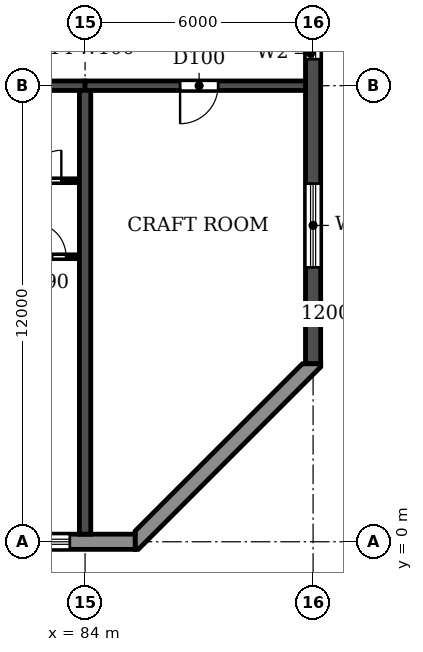
"""IFC4 building model, lengths in metres.
Left out: names, types, materials, properties, quantities, classifications, styles, units other than length and angle.
Written with IfcOpenShell. Run it as: python <this file> out.ifc"""

import sys

from ifc_helpers import new_model, si_unit, direction, frame, frame_2d, origin, place, context, subcontext, project, spatial, polyline, rectangle, outline, extrude, element, fill, save


model = new_model("IFC4")
c1 = context("Model", 3, precision=1e-05, world=origin(), true_north=direction((0.0, 1.0)))
c2 = subcontext(c1, "Body", "Model", "MODEL_VIEW")
j1 = project(units=[si_unit("LENGTHUNIT", "METRE"), si_unit("PLANEANGLEUNIT", "RADIAN")], contexts=[c1])
p1 = place(None, origin())
s1 = spatial("IfcSite", under=j1, at=p1, CompositionType="ELEMENT")
p2 = place(p1, origin())
s2 = spatial("IfcBuilding", under=s1, at=p2, CompositionType="ELEMENT")
p3 = place(p2, frame((0.0, 0.0, 122.4)))
s3 = spatial("IfcBuildingStorey", under=s2, at=p3, CompositionType="ELEMENT", Elevation=122.4)
p4 = place(p3, frame((84.0, 0.2, 0.0), z_axis=(0.0, 0.0, 1.0), x_axis=(0.0, 1.0, 0.0)))
e1 = element("IfcWall", 1, at=p4, inside=s3, PredefinedType="SHEAR", context=c2, shape_type="SweptSolid", body=[
    extrude(rectangle(XDim=11.675, YDim=0.3, at=frame_2d((5.837, 0.0))), origin(), (0.0, 0.0, 1.0), 3.07),
])
p5 = place(p3, frame((90.0, 4.683, 0.0), z_axis=(0.0, 0.0, 1.0), x_axis=(0.0, 1.0, 0.0)))
e2 = element("IfcWall", 2, at=p5, inside=s3, PredefinedType="SHEAR", context=c2, shape_type="SweptSolid", body=[
    extrude(rectangle(XDim=33.034, YDim=0.4, at=frame_2d((16.517, 0.0))), origin(), (0.0, 0.0, 1.0), 3.07),
])
p6 = place(p5, frame((23.817, 0.0, 0.9)))
e3 = element("IfcOpeningElement", 3, at=p6, cuts=e2, PredefinedType="OPENING", context=c2, shape_type="SweptSolid", body=[
    extrude(rectangle(XDim=1.2, YDim=1.5, at=frame_2d((0.6, 0.75))), frame((0.0, 0.21, 0.0), z_axis=(0.0, -1.0, 0.0), x_axis=(1.0, 0.0, 0.0)), (0.0, 0.0, 1.0), 0.42),
])
p7 = place(p5, frame((8.017, 0.0, 0.9)))
e4 = element("IfcOpeningElement", 4, at=p7, cuts=e2, PredefinedType="OPENING", context=c2, shape_type="SweptSolid", body=[
    extrude(rectangle(XDim=1.2, YDim=1.5, at=frame_2d((0.6, 0.75))), frame((0.0, 0.21, 0.0), z_axis=(0.0, -1.0, 0.0), x_axis=(1.0, 0.0, 0.0)), (0.0, 0.0, 1.0), 0.42),
])
p8 = place(p5, frame((28.293, 0.0, 0.6)))
e5 = element("IfcOpeningElement", 5, at=p8, cuts=e2, PredefinedType="OPENING", context=c2, shape_type="SweptSolid", body=[
    extrude(rectangle(XDim=2.2, YDim=1.8, at=frame_2d((1.1, 0.9))), frame((0.0, 0.21, 0.0), z_axis=(0.0, -1.0, 0.0), x_axis=(1.0, 0.0, 0.0)), (0.0, 0.0, 1.0), 0.42),
])
p9 = place(p5, frame((2.541, 0.0, 0.6)))
e6 = element("IfcOpeningElement", 6, at=p9, cuts=e2, PredefinedType="OPENING", context=c2, shape_type="SweptSolid", body=[
    extrude(rectangle(XDim=2.2, YDim=1.8, at=frame_2d((1.1, 0.9))), frame((0.0, 0.21, 0.0), z_axis=(0.0, -1.0, 0.0), x_axis=(1.0, 0.0, 0.0)), (0.0, 0.0, 1.0), 0.42),
])
p10 = place(p3, frame((78.0, 12.0, 0.0), z_axis=(0.0, 0.0, 1.0), x_axis=(1.0, 0.0, 0.0)))
e7 = element("IfcWall", 7, at=p10, inside=s3, PredefinedType="SHEAR", context=c2, shape_type="SweptSolid", body=[
    extrude(rectangle(XDim=6.0, YDim=0.25, at=frame_2d((3.0, 0.0))), origin(), (0.0, 0.0, 1.0), 2.47),
])
p11 = place(p10, frame((2.55, 0.0, 0.0)))
e8 = element("IfcOpeningElement", 8, at=p11, cuts=e7, PredefinedType="OPENING", context=c2, shape_type="SweptSolid", body=[
    extrude(rectangle(XDim=1.0, YDim=2.1, at=frame_2d((0.5, 1.05))), frame((0.0, 0.135, 0.0), z_axis=(0.0, -1.0, 0.0), x_axis=(1.0, 0.0, 0.0)), (0.0, 0.0, 1.0), 0.27),
])
p12 = place(p3, frame((84.0, 12.0, 0.0), z_axis=(0.0, 0.0, 1.0), x_axis=(1.0, 0.0, 0.0)))
e9 = element("IfcWall", 9, at=p12, inside=s3, PredefinedType="SHEAR", context=c2, shape_type="SweptSolid", body=[
    extrude(rectangle(XDim=5.8, YDim=0.25, at=frame_2d((2.9, 0.0))), origin(), (0.0, 0.0, 1.0), 2.47),
])
p13 = place(p12, frame((2.5, 0.0, 0.0)))
e10 = element("IfcOpeningElement", 10, at=p13, cuts=e9, PredefinedType="OPENING", context=c2, shape_type="SweptSolid", body=[
    extrude(rectangle(XDim=1.0, YDim=2.1, at=frame_2d((0.5, 1.05))), frame((0.0, 0.135, 0.0), z_axis=(0.0, -1.0, 0.0), x_axis=(1.0, 0.0, 0.0)), (0.0, 0.0, 1.0), 0.27),
])
p14 = place(p3, frame((16.683, 0.0, 0.0), z_axis=(0.0, 0.0, 1.0), x_axis=(1.0, 0.0, 0.0)))
e11 = element("IfcWall", 11, at=p14, inside=s3, PredefinedType="STANDARD", context=c2, shape_type="SweptSolid", body=[
    extrude(rectangle(XDim=68.634, YDim=0.4, at=frame_2d((34.317, 0.0))), origin(), (0.0, 0.0, 1.0), 3.07),
])
p15 = place(p14, frame((1.717, 0.0, 0.9)))
e12 = element("IfcOpeningElement", 12, at=p15, cuts=e11, PredefinedType="OPENING", context=c2, shape_type="SweptSolid", body=[
    extrude(rectangle(XDim=2.2, YDim=1.5, at=frame_2d((1.1, 0.75))), frame((0.0, 0.21, 0.0), z_axis=(0.0, -1.0, 0.0), x_axis=(1.0, 0.0, 0.0)), (0.0, 0.0, 1.0), 0.42),
])
p16 = place(p14, frame((4.717, 0.0, 0.9)))
e13 = element("IfcOpeningElement", 13, at=p16, cuts=e11, PredefinedType="OPENING", context=c2, shape_type="SweptSolid", body=[
    extrude(rectangle(XDim=2.2, YDim=1.5, at=frame_2d((1.1, 0.75))), frame((0.0, 0.21, 0.0), z_axis=(0.0, -1.0, 0.0), x_axis=(1.0, 0.0, 0.0)), (0.0, 0.0, 1.0), 0.42),
])
p17 = place(p14, frame((7.717, 0.0, 0.9)))
e14 = element("IfcOpeningElement", 14, at=p17, cuts=e11, PredefinedType="OPENING", context=c2, shape_type="SweptSolid", body=[
    extrude(rectangle(XDim=2.2, YDim=1.5, at=frame_2d((1.1, 0.75))), frame((0.0, 0.21, 0.0), z_axis=(0.0, -1.0, 0.0), x_axis=(1.0, 0.0, 0.0)), (0.0, 0.0, 1.0), 0.42),
])
p18 = place(p14, frame((10.717, 0.0, 0.9)))
e15 = element("IfcOpeningElement", 15, at=p18, cuts=e11, PredefinedType="OPENING", context=c2, shape_type="SweptSolid", body=[
    extrude(rectangle(XDim=2.2, YDim=1.5, at=frame_2d((1.1, 0.75))), frame((0.0, 0.21, 0.0), z_axis=(0.0, -1.0, 0.0), x_axis=(1.0, 0.0, 0.0)), (0.0, 0.0, 1.0), 0.42),
])
p19 = place(p14, frame((13.717, 0.0, 0.9)))
e16 = element("IfcOpeningElement", 16, at=p19, cuts=e11, PredefinedType="OPENING", context=c2, shape_type="SweptSolid", body=[
    extrude(rectangle(XDim=2.2, YDim=1.5, at=frame_2d((1.1, 0.75))), frame((0.0, 0.21, 0.0), z_axis=(0.0, -1.0, 0.0), x_axis=(1.0, 0.0, 0.0)), (0.0, 0.0, 1.0), 0.42),
])
p20 = place(p14, frame((16.717, 0.0, 0.9)))
e17 = element("IfcOpeningElement", 17, at=p20, cuts=e11, PredefinedType="OPENING", context=c2, shape_type="SweptSolid", body=[
    extrude(rectangle(XDim=2.2, YDim=1.5, at=frame_2d((1.1, 0.75))), frame((0.0, 0.21, 0.0), z_axis=(0.0, -1.0, 0.0), x_axis=(1.0, 0.0, 0.0)), (0.0, 0.0, 1.0), 0.42),
])
p21 = place(p14, frame((19.717, 0.0, 0.9)))
e18 = element("IfcOpeningElement", 18, at=p21, cuts=e11, PredefinedType="OPENING", context=c2, shape_type="SweptSolid", body=[
    extrude(rectangle(XDim=2.2, YDim=1.5, at=frame_2d((1.1, 0.75))), frame((0.0, 0.21, 0.0), z_axis=(0.0, -1.0, 0.0), x_axis=(1.0, 0.0, 0.0)), (0.0, 0.0, 1.0), 0.42),
])
p22 = place(p14, frame((22.917, 0.0, 0.0)))
e19 = element("IfcOpeningElement", 19, at=p22, cuts=e11, PredefinedType="OPENING", context=c2, shape_type="SweptSolid", body=[
    extrude(rectangle(XDim=1.8, YDim=2.4, at=frame_2d((0.9, 1.2))), frame((0.0, 0.21, 0.0), z_axis=(0.0, -1.0, 0.0), x_axis=(1.0, 0.0, 0.0)), (0.0, 0.0, 1.0), 0.42),
])
p23 = place(p14, frame((25.717, 0.0, 0.9)))
e20 = element("IfcOpeningElement", 20, at=p23, cuts=e11, PredefinedType="OPENING", context=c2, shape_type="SweptSolid", body=[
    extrude(rectangle(XDim=2.2, YDim=1.5, at=frame_2d((1.1, 0.75))), frame((0.0, 0.21, 0.0), z_axis=(0.0, -1.0, 0.0), x_axis=(1.0, 0.0, 0.0)), (0.0, 0.0, 1.0), 0.42),
])
p24 = place(p14, frame((28.717, 0.0, 0.9)))
e21 = element("IfcOpeningElement", 21, at=p24, cuts=e11, PredefinedType="OPENING", context=c2, shape_type="SweptSolid", body=[
    extrude(rectangle(XDim=2.2, YDim=1.5, at=frame_2d((1.1, 0.75))), frame((0.0, 0.21, 0.0), z_axis=(0.0, -1.0, 0.0), x_axis=(1.0, 0.0, 0.0)), (0.0, 0.0, 1.0), 0.42),
])
p25 = place(p14, frame((31.717, 0.0, 0.9)))
e22 = element("IfcOpeningElement", 22, at=p25, cuts=e11, PredefinedType="OPENING", context=c2, shape_type="SweptSolid", body=[
    extrude(rectangle(XDim=2.2, YDim=1.5, at=frame_2d((1.1, 0.75))), frame((0.0, 0.21, 0.0), z_axis=(0.0, -1.0, 0.0), x_axis=(1.0, 0.0, 0.0)), (0.0, 0.0, 1.0), 0.42),
])
p26 = place(p14, frame((34.917, 0.0, 0.0)))
e23 = element("IfcOpeningElement", 23, at=p26, cuts=e11, PredefinedType="OPENING", context=c2, shape_type="SweptSolid", body=[
    extrude(rectangle(XDim=1.8, YDim=2.4, at=frame_2d((0.9, 1.2))), frame((0.0, 0.21, 0.0), z_axis=(0.0, -1.0, 0.0), x_axis=(1.0, 0.0, 0.0)), (0.0, 0.0, 1.0), 0.42),
])
p27 = place(p14, frame((37.717, 0.0, 0.9)))
e24 = element("IfcOpeningElement", 24, at=p27, cuts=e11, PredefinedType="OPENING", context=c2, shape_type="SweptSolid", body=[
    extrude(rectangle(XDim=2.2, YDim=1.5, at=frame_2d((1.1, 0.75))), frame((0.0, 0.21, 0.0), z_axis=(0.0, -1.0, 0.0), x_axis=(1.0, 0.0, 0.0)), (0.0, 0.0, 1.0), 0.42),
])
p28 = place(p14, frame((40.717, 0.0, 0.9)))
e25 = element("IfcOpeningElement", 25, at=p28, cuts=e11, PredefinedType="OPENING", context=c2, shape_type="SweptSolid", body=[
    extrude(rectangle(XDim=2.2, YDim=1.5, at=frame_2d((1.1, 0.75))), frame((0.0, 0.21, 0.0), z_axis=(0.0, -1.0, 0.0), x_axis=(1.0, 0.0, 0.0)), (0.0, 0.0, 1.0), 0.42),
])
p29 = place(p14, frame((43.717, 0.0, 0.9)))
e26 = element("IfcOpeningElement", 26, at=p29, cuts=e11, PredefinedType="OPENING", context=c2, shape_type="SweptSolid", body=[
    extrude(rectangle(XDim=2.2, YDim=1.5, at=frame_2d((1.1, 0.75))), frame((0.0, 0.21, 0.0), z_axis=(0.0, -1.0, 0.0), x_axis=(1.0, 0.0, 0.0)), (0.0, 0.0, 1.0), 0.42),
])
p30 = place(p14, frame((46.917, 0.0, 0.0)))
e27 = element("IfcOpeningElement", 27, at=p30, cuts=e11, PredefinedType="OPENING", context=c2, shape_type="SweptSolid", body=[
    extrude(rectangle(XDim=1.8, YDim=2.4, at=frame_2d((0.9, 1.2))), frame((0.0, 0.21, 0.0), z_axis=(0.0, -1.0, 0.0), x_axis=(1.0, 0.0, 0.0)), (0.0, 0.0, 1.0), 0.42),
])
p31 = place(p14, frame((49.717, 0.0, 0.9)))
e28 = element("IfcOpeningElement", 28, at=p31, cuts=e11, PredefinedType="OPENING", context=c2, shape_type="SweptSolid", body=[
    extrude(rectangle(XDim=2.2, YDim=1.5, at=frame_2d((1.1, 0.75))), frame((0.0, 0.21, 0.0), z_axis=(0.0, -1.0, 0.0), x_axis=(1.0, 0.0, 0.0)), (0.0, 0.0, 1.0), 0.42),
])
p32 = place(p14, frame((52.717, 0.0, 0.9)))
e29 = element("IfcOpeningElement", 29, at=p32, cuts=e11, PredefinedType="OPENING", context=c2, shape_type="SweptSolid", body=[
    extrude(rectangle(XDim=2.2, YDim=1.5, at=frame_2d((1.1, 0.75))), frame((0.0, 0.21, 0.0), z_axis=(0.0, -1.0, 0.0), x_axis=(1.0, 0.0, 0.0)), (0.0, 0.0, 1.0), 0.42),
])
p33 = place(p14, frame((55.717, 0.0, 0.9)))
e30 = element("IfcOpeningElement", 30, at=p33, cuts=e11, PredefinedType="OPENING", context=c2, shape_type="SweptSolid", body=[
    extrude(rectangle(XDim=2.2, YDim=1.5, at=frame_2d((1.1, 0.75))), frame((0.0, 0.21, 0.0), z_axis=(0.0, -1.0, 0.0), x_axis=(1.0, 0.0, 0.0)), (0.0, 0.0, 1.0), 0.42),
])
p34 = place(p14, frame((58.917, 0.0, 0.0)))
e31 = element("IfcOpeningElement", 31, at=p34, cuts=e11, PredefinedType="OPENING", context=c2, shape_type="SweptSolid", body=[
    extrude(rectangle(XDim=1.8, YDim=2.4, at=frame_2d((0.9, 1.2))), frame((0.0, 0.21, 0.0), z_axis=(0.0, -1.0, 0.0), x_axis=(1.0, 0.0, 0.0)), (0.0, 0.0, 1.0), 0.42),
])
p35 = place(p14, frame((61.717, 0.0, 0.9)))
e32 = element("IfcOpeningElement", 32, at=p35, cuts=e11, PredefinedType="OPENING", context=c2, shape_type="SweptSolid", body=[
    extrude(rectangle(XDim=2.2, YDim=1.5, at=frame_2d((1.1, 0.75))), frame((0.0, 0.21, 0.0), z_axis=(0.0, -1.0, 0.0), x_axis=(1.0, 0.0, 0.0)), (0.0, 0.0, 1.0), 0.42),
])
p36 = place(p14, frame((64.717, 0.0, 0.9)))
e33 = element("IfcOpeningElement", 33, at=p36, cuts=e11, PredefinedType="OPENING", context=c2, shape_type="SweptSolid", body=[
    extrude(rectangle(XDim=2.2, YDim=1.5, at=frame_2d((1.1, 0.75))), frame((0.0, 0.21, 0.0), z_axis=(0.0, -1.0, 0.0), x_axis=(1.0, 0.0, 0.0)), (0.0, 0.0, 1.0), 0.42),
])
p37 = place(p3, origin())
e34 = element("IfcWall", 34, at=p37, inside=s3, PredefinedType="STANDARD", context=c2, shape_type="SweptSolid", body=[
    extrude(outline(polyline([(85.317, -0.2), (85.4, -0.2), (90.2, 4.6), (90.2, 4.683), (89.717, 4.683), (85.317, 0.283), (85.317, -0.2)])), origin(), (0.0, 0.0, 1.0), 3.07),
])
p38 = place(p3, frame((80.95, 7.5, 0.0), z_axis=(0.0, 0.0, 1.0), x_axis=(1.0, 0.0, 0.0)))
e35 = element("IfcWall", 35, at=p38, inside=s3, PredefinedType="PARTITIONING", context=c2, shape_type="SweptSolid", body=[
    extrude(rectangle(XDim=2.89, YDim=0.1, at=frame_2d((1.445, 0.0))), origin(), (0.0, 0.0, 1.0), 3.07),
])
p39 = place(p38, frame((1.65, 0.0, 0.0)))
e36 = element("IfcOpeningElement", 36, at=p39, cuts=e35, PredefinedType="OPENING", context=c2, shape_type="SweptSolid", body=[
    extrude(rectangle(XDim=0.9, YDim=2.1, at=frame_2d((0.45, 1.05))), frame((0.0, 0.06, 0.0), z_axis=(0.0, -1.0, 0.0), x_axis=(1.0, 0.0, 0.0)), (0.0, 0.0, 1.0), 0.12),
])
p40 = place(p3, frame((81.9, 9.5, 0.0), z_axis=(0.0, 0.0, 1.0), x_axis=(1.0, 0.0, 0.0)))
e37 = element("IfcWall", 37, at=p40, inside=s3, PredefinedType="PARTITIONING", context=c2, shape_type="SweptSolid", body=[
    extrude(rectangle(XDim=1.94, YDim=0.1, at=frame_2d((0.97, 0.0))), origin(), (0.0, 0.0, 1.0), 3.07),
])
p41 = place(p40, frame((0.675, 0.0, 0.0)))
e38 = element("IfcOpeningElement", 38, at=p41, cuts=e37, PredefinedType="OPENING", context=c2, shape_type="SweptSolid", body=[
    extrude(rectangle(XDim=0.8, YDim=2.1, at=frame_2d((0.4, 1.05))), frame((0.0, 0.06, 0.0), z_axis=(0.0, -1.0, 0.0), x_axis=(1.0, 0.0, 0.0)), (0.0, 0.0, 1.0), 0.12),
])
p42 = place(p36, origin())
e39 = element("IfcWindow", 39, at=p42, inside=s3, PartitioningType="DOUBLE_PANEL_HORIZONTAL", PredefinedType="WINDOW", context=c2, shape_type="SweptSolid", body=[
    extrude(rectangle(XDim=2.2, YDim=1.5, at=frame_2d((1.1, 0.75))), frame((0.0, 0.03, 0.0), z_axis=(0.0, -1.0, 0.0), x_axis=(1.0, 0.0, 0.0)), (0.0, 0.0, 1.0), 0.06),
])
fill(e33, e39)
p43 = place(p7, origin())
e40 = element("IfcWindow", 40, at=p43, inside=s3, PartitioningType="SINGLE_PANEL", PredefinedType="WINDOW", context=c2, shape_type="SweptSolid", body=[
    extrude(rectangle(XDim=1.2, YDim=1.5, at=frame_2d((0.6, 0.75))), frame((0.0, 0.03, 0.0), z_axis=(0.0, -1.0, 0.0), x_axis=(1.0, 0.0, 0.0)), (0.0, 0.0, 1.0), 0.06),
])
fill(e4, e40)
p44 = place(p9, origin())
e41 = element("IfcWindow", 41, at=p44, inside=s3, PartitioningType="DOUBLE_PANEL_HORIZONTAL", PredefinedType="WINDOW", context=c2, shape_type="SweptSolid", body=[
    extrude(rectangle(XDim=2.2, YDim=1.8, at=frame_2d((1.1, 0.9))), frame((0.0, 0.03, 0.0), z_axis=(0.0, -1.0, 0.0), x_axis=(1.0, 0.0, 0.0)), (0.0, 0.0, 1.0), 0.06),
])
fill(e6, e41)
p45 = place(p41, origin())
e42 = element("IfcDoor", 42, at=p45, inside=s3, OperationType="SINGLE_SWING_RIGHT", PredefinedType="DOOR", context=c2, shape_type="SweptSolid", body=[
    extrude(rectangle(XDim=0.8, YDim=2.1, at=frame_2d((0.4, 1.05))), frame((0.0, 0.025, 0.0), z_axis=(0.0, -1.0, 0.0), x_axis=(1.0, 0.0, 0.0)), (0.0, 0.0, 1.0), 0.05),
])
fill(e38, e42)
p46 = place(p39, origin())
e43 = element("IfcDoor", 43, at=p46, inside=s3, OperationType="SINGLE_SWING_LEFT", PredefinedType="DOOR", context=c2, shape_type="SweptSolid", body=[
    extrude(rectangle(XDim=0.9, YDim=2.1, at=frame_2d((0.45, 1.05))), frame((0.0, 0.025, 0.0), z_axis=(0.0, -1.0, 0.0), x_axis=(1.0, 0.0, 0.0)), (0.0, 0.0, 1.0), 0.05),
])
fill(e36, e43)
p47 = place(p13, frame((1.0, 0.0, 0.0), z_axis=(0.0, 0.0, 1.0), x_axis=(-1.0, 0.0, 0.0)))
e44 = element("IfcDoor", 44, at=p47, inside=s3, OperationType="SINGLE_SWING_RIGHT", PredefinedType="DOOR", context=c2, shape_type="SweptSolid", body=[
    extrude(rectangle(XDim=1.0, YDim=2.1, at=frame_2d((0.5, 1.05))), frame((0.0, 0.025, 0.0), z_axis=(0.0, -1.0, 0.0), x_axis=(1.0, 0.0, 0.0)), (0.0, 0.0, 1.0), 0.05),
])
fill(e10, e44)
save(model, sys.argv[1])
